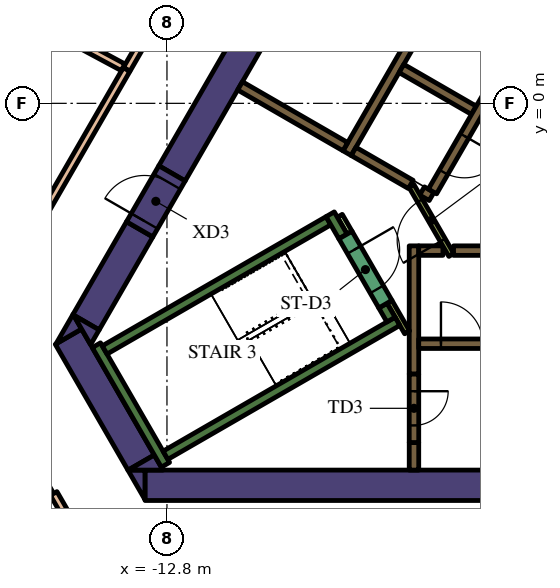
"""IFC4 building model, lengths in metres.
Left out: names, types, materials, properties, quantities, classifications, styles, units other than length and angle.
Written with IfcOpenShell. Run it as: python <this file> out.ifc"""

import sys

from ifc_helpers import new_model, si_unit, direction, frame, frame_2d, origin, place, context, subcontext, project, spatial, polyline, rectangle, outline, extrude, element, fill, save


model = new_model("IFC4")
c1 = context("Model", 3, precision=1e-05, world=origin(), true_north=direction((0.0, 1.0)))
c2 = subcontext(c1, "Body", "Model", "MODEL_VIEW")
j1 = project(units=[si_unit("LENGTHUNIT", "METRE"), si_unit("PLANEANGLEUNIT", "RADIAN")], contexts=[c1])
p1 = place(None, origin())
s1 = spatial("IfcSite", under=j1, at=p1, CompositionType="ELEMENT")
p2 = place(p1, origin())
s2 = spatial("IfcBuilding", under=s1, at=p2, CompositionType="ELEMENT")
p3 = place(p2, frame((0.0, 0.0, 196.2)))
s3 = spatial("IfcBuildingStorey", under=s2, at=p3, CompositionType="ELEMENT", Elevation=196.2)
p4 = place(p3, frame((-13.378, -10.05, 0.0), z_axis=(0.0, 0.0, 1.0), x_axis=(1.0, 0.0, 0.0)))
e1 = element("IfcWall", 1, at=p4, inside=s3, PredefinedType="SOLIDWALL", context=c2, shape_type="SweptSolid", body=[
    extrude(rectangle(XDim=22.282, YDim=0.8, at=frame_2d((11.141, 0.0))), origin(), (0.0, 0.0, 1.0), 5.4),
])
p5 = place(p3, origin())
e2 = element("IfcWall", 2, at=p5, inside=s3, PredefinedType="SOLIDWALL", context=c2, shape_type="SweptSolid", body=[
    extrude(outline(polyline([(-13.828, -9.65), (-13.38, -9.65), (-13.38, -10.426), (-13.828, -9.65)])), origin(), (0.0, 0.0, 1.0), 5.4),
])
p6 = place(p3, frame((-15.392, -6.14, 0.0), z_axis=(0.0, 0.0, 1.0), x_axis=(0.499984020225, -0.866034629516, 0.0)))
e3 = element("IfcWall", 3, at=p6, inside=s3, PredefinedType="SOLIDWALL", context=c2, shape_type="SweptSolid", body=[
    extrude(rectangle(XDim=3.824, YDim=0.8, at=frame_2d((1.912, 0.0))), origin(), (0.0, 0.0, 1.0), 5.4),
])
e4 = element("IfcWall", 4, at=p5, inside=s3, PredefinedType="SOLIDWALL", context=c2, shape_type="SweptSolid", body=[
    extrude(outline(polyline([(-15.047, -5.938), (-15.719, -6.326), (-15.271, -5.55), (-15.047, -5.938)])), origin(), (0.0, 0.0, 1.0), 5.4),
])
e5 = element("IfcWall", 5, at=p5, inside=s3, PredefinedType="SOLIDWALL", context=c2, shape_type="SweptSolid", body=[
    extrude(outline(polyline([(-12.904, -9.65), (-13.82, -9.65), (-13.133, -9.253), (-12.904, -9.65)])), origin(), (0.0, 0.0, 1.0), 5.4),
])
p7 = place(p3, frame((-13.518, -3.314, 0.0), z_axis=(0.0, 0.0, 1.0), x_axis=(-0.499969377405, -0.866043083026, 0.0)))
e6 = element("IfcWall", 6, at=p7, inside=s3, PredefinedType="SOLIDWALL", context=c2, shape_type="SweptSolid", body=[
    extrude(rectangle(XDim=2.824, YDim=0.8, at=frame_2d((1.412, 0.0))), origin(), (0.0, 0.0, 1.0), 5.4),
])
e7 = element("IfcWall", 7, at=p5, inside=s3, PredefinedType="SOLIDWALL", context=c2, shape_type="SweptSolid", body=[
    extrude(outline(polyline([(-14.809, -6.35), (-15.257, -5.574), (-14.585, -5.962), (-14.809, -6.35)])), origin(), (0.0, 0.0, 1.0), 5.4),
])
p8 = place(p3, frame((-4.321, 12.616, 0.0), z_axis=(0.0, 0.0, 1.0), x_axis=(-0.500009809857, -0.866019739987, 0.0)))
e8 = element("IfcWall", 8, at=p8, inside=s3, PredefinedType="SOLIDWALL", context=c2, shape_type="SweptSolid", body=[
    extrude(rectangle(XDim=16.695, YDim=0.8, at=frame_2d((8.347, 0.0))), origin(), (0.0, 0.0, 1.0), 5.4),
])
p9 = place(p3, frame((-12.84, -9.511, 0.0), z_axis=(0.0, 0.0, 1.0), x_axis=(-0.499997733992, 0.866026712061, 0.0)))
e9 = element("IfcWall", 9, at=p9, inside=s3, PredefinedType="SOLIDWALL", context=c2, shape_type="SweptSolid", body=[
    extrude(rectangle(XDim=3.634, YDim=0.25, at=frame_2d((1.817, 0.0))), origin(), (0.0, 0.0, 1.0), 5.4),
])
p10 = place(p3, frame((-14.44, -6.49, 0.0), z_axis=(0.0, 0.0, 1.0), x_axis=(0.866022966069, 0.500004222222, 0.0)))
e10 = element("IfcWall", 10, at=p10, inside=s3, PredefinedType="SOLIDWALL", context=c2, shape_type="SweptSolid", body=[
    extrude(rectangle(XDim=6.8, YDim=0.25, at=frame_2d((3.4, 0.0))), origin(), (0.0, 0.0, 1.0), 5.4),
])
p11 = place(p3, frame((-8.168, -3.503, 0.0), z_axis=(0.0, 0.0, 1.0), x_axis=(-0.499952099219, 0.866053057547, 0.0)))
e11 = element("IfcWall", 11, at=p11, inside=s3, PredefinedType="SOLIDWALL", context=c2, shape_type="SweptSolid", body=[
    extrude(rectangle(XDim=0.675, YDim=0.25, at=frame_2d((0.337, 0.0))), origin(), (0.0, 0.0, 1.0), 5.4),
])
p12 = place(p3, frame((-12.84, -9.261, 0.0), z_axis=(0.0, 0.0, 1.0), x_axis=(0.866016039709, 0.500016218704, 0.0)))
e12 = element("IfcWall", 12, at=p12, inside=s3, PredefinedType="SOLIDWALL", context=c2, shape_type="SweptSolid", body=[
    extrude(rectangle(XDim=7.05, YDim=0.25, at=frame_2d((3.525, 0.0))), origin(), (0.0, 0.0, 1.0), 5.4),
])
p13 = place(p3, frame((-6.905, -5.69, 0.0), z_axis=(0.0, 0.0, 1.0), x_axis=(-0.500402024738, 0.865793170242, 0.0)))
e13 = element("IfcWall", 13, at=p13, inside=s3, PredefinedType="SOLIDWALL", context=c2, shape_type="SweptSolid", body=[
    extrude(rectangle(XDim=0.425, YDim=0.25, at=frame_2d((0.212, 0.0))), origin(), (0.0, 0.0, 1.0), 5.4),
])
p14 = place(p3, frame((-6.3, -8.925, 0.0), z_axis=(0.0, 0.0, 1.0), x_axis=(0.0, -1.0, 0.0)))
e14 = element("IfcWall", 14, at=p14, inside=s3, PredefinedType="SOLIDWALL", context=c2, shape_type="SweptSolid", body=[
    extrude(rectangle(XDim=0.725, YDim=0.25, at=frame_2d((0.363, 0.0))), origin(), (0.0, 0.0, 1.0), 5.4),
])
p15 = place(p3, frame((-5.259, -3.875, 0.0), z_axis=(0.0, 0.0, 1.0), x_axis=(1.0, 0.0, 0.0)))
e15 = element("IfcWall", 15, at=p15, inside=s3, PredefinedType="SOLIDWALL", context=c2, shape_type="SweptSolid", body=[
    extrude(rectangle(XDim=10.489, YDim=0.25, at=frame_2d((5.244, 0.0))), origin(), (0.0, 0.0, 1.0), 5.4),
])
p16 = place(p3, frame((-6.3, -7.125, 0.0), z_axis=(0.0, 0.0, 1.0), x_axis=(0.0, 1.0, 0.0)))
e16 = element("IfcWall", 16, at=p16, inside=s3, PredefinedType="SOLIDWALL", context=c2, shape_type="SweptSolid", body=[
    extrude(rectangle(XDim=3.375, YDim=0.25, at=frame_2d((1.687, 0.0))), origin(), (0.0, 0.0, 1.0), 5.4),
])
p17 = place(p3, frame((-6.175, -3.875, 0.0), z_axis=(0.0, 0.0, 1.0), x_axis=(1.0, 0.0, 0.0)))
e17 = element("IfcWall", 17, at=p17, inside=s3, PredefinedType="SOLIDWALL", context=c2, shape_type="SweptSolid", body=[
    extrude(rectangle(XDim=0.637, YDim=0.25, at=frame_2d((0.318, 0.0))), origin(), (0.0, 0.0, 1.0), 5.4),
])
p18 = place(p3, frame((-3.02, 7.419, 0.0), z_axis=(0.0, 0.0, 1.0), x_axis=(-0.500022956343, -0.866012149528, 0.0)))
e18 = element("IfcWall", 18, at=p18, inside=s3, PredefinedType="SOLIDWALL", context=c2, shape_type="SweptSolid", body=[
    extrude(rectangle(XDim=10.08, YDim=0.25, at=frame_2d((5.04, 0.0))), origin(), (0.0, 0.0, 1.0), 5.4),
])
p19 = place(p3, frame((-4.724, -0.182, 0.0), z_axis=(0.0, 0.0, 1.0), x_axis=(-0.866008176907, 0.50002983664, 0.0)))
e19 = element("IfcWall", 19, at=p19, inside=s3, PredefinedType="SOLIDWALL", context=c2, shape_type="SweptSolid", body=[
    extrude(rectangle(XDim=2.2, YDim=0.25, at=frame_2d((1.1, 0.0))), origin(), (0.0, 0.0, 1.0), 5.4),
])
p20 = place(p3, frame((-6.088, -2.305, 0.0), z_axis=(0.0, 0.0, 1.0), x_axis=(0.866059450854, -0.499941024108, 0.0)))
e20 = element("IfcWall", 20, at=p20, inside=s3, PredefinedType="SOLIDWALL", context=c2, shape_type="SweptSolid", body=[
    extrude(rectangle(XDim=0.29, YDim=0.25, at=frame_2d((0.145, 0.0))), origin(), (0.0, 0.0, 1.0), 5.4),
])
p21 = place(p3, frame((-7.889, -1.265, 0.0), z_axis=(0.0, 0.0, 1.0), x_axis=(0.865986741702, -0.500066958712, 0.0)))
e21 = element("IfcWall", 21, at=p21, inside=s3, PredefinedType="SOLIDWALL", context=c2, shape_type="SweptSolid", body=[
    extrude(rectangle(XDim=1.738, YDim=0.25, at=frame_2d((0.869, 0.0))), origin(), (0.0, 0.0, 1.0), 5.4),
])
p22 = place(p3, frame((-8.106, -1.14, 0.0), z_axis=(0.0, 0.0, 1.0), x_axis=(-0.866008981251, 0.500028443584, 0.0)))
e22 = element("IfcWall", 22, at=p22, inside=s3, PredefinedType="SOLIDWALL", context=c2, shape_type="SweptSolid", body=[
    extrude(rectangle(XDim=3.2, YDim=0.25, at=frame_2d((1.6, 0.0))), origin(), (0.0, 0.0, 1.0), 5.4),
])
p23 = place(p3, frame((-8.252, -2.958, 0.0), z_axis=(0.0, 0.0, 1.0), x_axis=(0.500174715838, -0.865924508047, 0.0)))
e23 = element("IfcWall", 23, at=p23, inside=s3, PredefinedType="PARTITIONING", context=c2, shape_type="SweptSolid", body=[
    extrude(rectangle(XDim=0.514, YDim=0.15, at=frame_2d((0.257, 0.0))), origin(), (0.0, 0.0, 1.0), 4.65),
])
p24 = place(p3, frame((-6.48, -6.027, 0.0), z_axis=(0.0, 0.0, 1.0), x_axis=(-0.499927229454, 0.866067413802, 0.0)))
e24 = element("IfcWall", 24, at=p24, inside=s3, PredefinedType="PARTITIONING", context=c2, shape_type="SweptSolid", body=[
    extrude(rectangle(XDim=0.929, YDim=0.15, at=frame_2d((0.464, 0.0))), origin(), (0.0, 0.0, 1.0), 5.4),
])
p25 = place(p3, frame((-6.175, -6.325, 0.0), z_axis=(0.0, 0.0, 1.0), x_axis=(1.0, 0.0, 0.0)))
e25 = element("IfcWall", 25, at=p25, inside=s3, PredefinedType="SOLIDWALL", context=c2, shape_type="SweptSolid", body=[
    extrude(rectangle(XDim=12.35, YDim=0.25, at=frame_2d((6.175, 0.0))), origin(), (0.0, 0.0, 1.0), 5.4),
])
p26 = place(p25, frame((0.585, 0.0, 0.0)))
e26 = element("IfcOpeningElement", 26, at=p26, cuts=e25, PredefinedType="OPENING", context=c2, shape_type="SweptSolid", body=[
    extrude(rectangle(XDim=1.1, YDim=2.1, at=frame_2d((0.55, 1.05))), frame((0.0, 0.135, 0.0), z_axis=(0.0, -1.0, 0.0), x_axis=(1.0, 0.0, 0.0)), (0.0, 0.0, 1.0), 0.27),
])
p27 = place(p25, frame((3.105, 0.0, 0.0)))
e27 = element("IfcOpeningElement", 27, at=p27, cuts=e25, PredefinedType="OPENING", context=c2, shape_type="SweptSolid", body=[
    extrude(rectangle(XDim=1.1, YDim=2.1, at=frame_2d((0.55, 1.05))), frame((0.0, 0.135, 0.0), z_axis=(0.0, -1.0, 0.0), x_axis=(1.0, 0.0, 0.0)), (0.0, 0.0, 1.0), 0.27),
])
p28 = place(p25, frame((5.625, 0.0, 0.0)))
e28 = element("IfcOpeningElement", 28, at=p28, cuts=e25, PredefinedType="OPENING", context=c2, shape_type="SweptSolid", body=[
    extrude(rectangle(XDim=1.1, YDim=2.1, at=frame_2d((0.55, 1.05))), frame((0.0, 0.135, 0.0), z_axis=(0.0, -1.0, 0.0), x_axis=(1.0, 0.0, 0.0)), (0.0, 0.0, 1.0), 0.27),
])
p29 = place(p25, frame((8.145, 0.0, 0.0)))
e29 = element("IfcOpeningElement", 29, at=p29, cuts=e25, PredefinedType="OPENING", context=c2, shape_type="SweptSolid", body=[
    extrude(rectangle(XDim=1.1, YDim=2.1, at=frame_2d((0.55, 1.05))), frame((0.0, 0.135, 0.0), z_axis=(0.0, -1.0, 0.0), x_axis=(1.0, 0.0, 0.0)), (0.0, 0.0, 1.0), 0.27),
])
p30 = place(p25, frame((10.665, 0.0, 0.0)))
e30 = element("IfcOpeningElement", 30, at=p30, cuts=e25, PredefinedType="OPENING", context=c2, shape_type="SweptSolid", body=[
    extrude(rectangle(XDim=1.1, YDim=2.1, at=frame_2d((0.55, 1.05))), frame((0.0, 0.135, 0.0), z_axis=(0.0, -1.0, 0.0), x_axis=(1.0, 0.0, 0.0)), (0.0, 0.0, 1.0), 0.27),
])
p31 = place(p3, frame((-0.898, 6.194, 0.0), z_axis=(0.0, 0.0, 1.0), x_axis=(-0.499996202215, -0.866027596426, 0.0)))
e31 = element("IfcWall", 31, at=p31, inside=s3, PredefinedType="SOLIDWALL", context=c2, shape_type="SweptSolid", body=[
    extrude(rectangle(XDim=9.83, YDim=0.25, at=frame_2d((4.915, 0.0))), origin(), (0.0, 0.0, 1.0), 5.4),
])
p32 = place(p31, frame((0.585, 0.0, 0.0)))
e32 = element("IfcOpeningElement", 32, at=p32, cuts=e31, PredefinedType="OPENING", context=c2, shape_type="SweptSolid", body=[
    extrude(rectangle(XDim=1.1, YDim=2.1, at=frame_2d((0.55, 1.05))), frame((0.0, 0.135, 0.0), z_axis=(0.0, -1.0, 0.0), x_axis=(1.0, 0.0, 0.0)), (0.0, 0.0, 1.0), 0.27),
])
p33 = place(p31, frame((3.105, 0.0, 0.0)))
e33 = element("IfcOpeningElement", 33, at=p33, cuts=e31, PredefinedType="OPENING", context=c2, shape_type="SweptSolid", body=[
    extrude(rectangle(XDim=1.1, YDim=2.1, at=frame_2d((0.55, 1.05))), frame((0.0, 0.135, 0.0), z_axis=(0.0, -1.0, 0.0), x_axis=(1.0, 0.0, 0.0)), (0.0, 0.0, 1.0), 0.27),
])
p34 = place(p31, frame((5.625, 0.0, 0.0)))
e34 = element("IfcOpeningElement", 34, at=p34, cuts=e31, PredefinedType="OPENING", context=c2, shape_type="SweptSolid", body=[
    extrude(rectangle(XDim=1.1, YDim=2.1, at=frame_2d((0.55, 1.05))), frame((0.0, 0.135, 0.0), z_axis=(0.0, -1.0, 0.0), x_axis=(1.0, 0.0, 0.0)), (0.0, 0.0, 1.0), 0.27),
])
p35 = place(p31, frame((8.145, 0.0, 0.0)))
e35 = element("IfcOpeningElement", 35, at=p35, cuts=e31, PredefinedType="OPENING", context=c2, shape_type="SweptSolid", body=[
    extrude(rectangle(XDim=1.1, YDim=2.1, at=frame_2d((0.55, 1.05))), frame((0.0, 0.135, 0.0), z_axis=(0.0, -1.0, 0.0), x_axis=(1.0, 0.0, 0.0)), (0.0, 0.0, 1.0), 0.27),
])
p36 = place(p3, frame((-8.103, -3.466, 0.0), z_axis=(0.0, 0.0, 1.0), x_axis=(0.500078061341, -0.865980330357, 0.0)))
e36 = element("IfcWall", 36, at=p36, inside=s3, PredefinedType="SOLIDWALL", context=c2, shape_type="SweptSolid", body=[
    extrude(rectangle(XDim=2.1, YDim=0.4, at=frame_2d((1.05, 0.0))), origin(), (0.0, 0.0, 1.0), 5.4),
])
p37 = place(p36, frame((0.45, 0.0, 0.0)))
e37 = element("IfcOpeningElement", 37, at=p37, cuts=e36, PredefinedType="OPENING", context=c2, shape_type="SweptSolid", body=[
    extrude(rectangle(XDim=1.2, YDim=2.1, at=frame_2d((0.6, 1.05))), frame((0.0, 0.21, 0.0), z_axis=(0.0, -1.0, 0.0), x_axis=(1.0, 0.0, 0.0)), (0.0, 0.0, 1.0), 0.42),
])
p38 = place(p3, frame((-6.3, -7.125, 0.0), z_axis=(0.0, 0.0, 1.0), x_axis=(0.0, -1.0, 0.0)))
e38 = element("IfcWall", 38, at=p38, inside=s3, PredefinedType="SOLIDWALL", context=c2, shape_type="SweptSolid", body=[
    extrude(rectangle(XDim=1.8, YDim=0.25, at=frame_2d((0.9, 0.0))), origin(), (0.0, 0.0, 1.0), 5.4),
])
p39 = place(p38, frame((0.45, 0.0, 0.0)))
e39 = element("IfcOpeningElement", 39, at=p39, cuts=e38, PredefinedType="OPENING", context=c2, shape_type="SweptSolid", body=[
    extrude(rectangle(XDim=0.9, YDim=2.1, at=frame_2d((0.45, 1.05))), frame((0.0, 0.135, 0.0), z_axis=(0.0, -1.0, 0.0), x_axis=(1.0, 0.0, 0.0)), (0.0, 0.0, 1.0), 0.27),
])
p40 = place(p3, frame((-5.317, -3.99, 0.0), z_axis=(0.0, 0.0, 1.0), x_axis=(-0.500027713859, 0.866009402589, 0.0)))
e40 = element("IfcWall", 40, at=p40, inside=s3, PredefinedType="PARTITIONING", context=c2, shape_type="SweptSolid", body=[
    extrude(rectangle(XDim=2.1, YDim=0.15, at=frame_2d((1.05, 0.0))), origin(), (0.0, 0.0, 1.0), 5.4),
])
p41 = place(p40, frame((0.45, 0.0, 0.0)))
e41 = element("IfcOpeningElement", 41, at=p41, cuts=e40, PredefinedType="OPENING", context=c2, shape_type="SweptSolid", body=[
    extrude(rectangle(XDim=1.2, YDim=2.1, at=frame_2d((0.6, 1.05))), frame((0.0, 0.085, 0.0), z_axis=(0.0, -1.0, 0.0), x_axis=(1.0, 0.0, 0.0)), (0.0, 0.0, 1.0), 0.17),
])
p42 = place(p3, frame((-13.518, -3.314, 0.0), z_axis=(0.0, 0.0, 1.0), x_axis=(0.500000056704, 0.866025371046, 0.0)))
e42 = element("IfcWall", 42, at=p42, inside=s3, PredefinedType="SOLIDWALL", context=c2, shape_type="SweptSolid", body=[
    extrude(rectangle(XDim=1.7, YDim=0.8, at=frame_2d((0.85, 0.0))), origin(), (0.0, 0.0, 1.0), 5.4),
])
p43 = place(p42, frame((0.25, 0.0, 0.0)))
e43 = element("IfcOpeningElement", 43, at=p43, cuts=e42, PredefinedType="OPENING", context=c2, shape_type="SweptSolid", body=[
    extrude(rectangle(XDim=1.2, YDim=2.1, at=frame_2d((0.6, 1.05))), frame((0.0, 0.41, 0.0), z_axis=(0.0, -1.0, 0.0), x_axis=(1.0, 0.0, 0.0)), (0.0, 0.0, 1.0), 0.82),
])
p44 = place(p3, frame((-7.706, 11.553, 0.0), z_axis=(0.0, 0.0, 1.0), x_axis=(-0.500005845305, -0.86602202897, 0.0)))
e44 = element("IfcWall", 44, at=p44, inside=s3, PredefinedType="PARTITIONING", context=c2, shape_type="SweptSolid", body=[
    extrude(rectangle(XDim=12.304, YDim=0.2, at=frame_2d((6.152, 0.0))), origin(), (0.0, 0.0, 1.0), 4.65),
])
p45 = place(p44, frame((5.552, 0.0, 0.0)))
e45 = element("IfcOpeningElement", 45, at=p45, cuts=e44, PredefinedType="OPENING", context=c2, shape_type="SweptSolid", body=[
    extrude(rectangle(XDim=1.2, YDim=2.1, at=frame_2d((0.6, 1.05))), frame((0.0, 0.11, 0.0), z_axis=(0.0, -1.0, 0.0), x_axis=(1.0, 0.0, 0.0)), (0.0, 0.0, 1.0), 0.22),
])
p46 = place(p3, frame((-25.969, -16.032, 0.0), z_axis=(0.0, 0.0, 1.0), x_axis=(0.866024433663, 0.500001680296, 0.0)))
e46 = element("IfcWall", 46, at=p46, inside=s3, PredefinedType="PARTITIONING", context=c2, shape_type="SweptSolid", body=[
    extrude(rectangle(XDim=11.706, YDim=0.2, at=frame_2d((5.853, 0.0))), origin(), (0.0, 0.0, 1.0), 4.65),
])
p47 = place(p46, frame((5.053, 0.0, 0.0)))
e47 = element("IfcOpeningElement", 47, at=p47, cuts=e46, PredefinedType="OPENING", context=c2, shape_type="SweptSolid", body=[
    extrude(rectangle(XDim=1.6, YDim=2.1, at=frame_2d((0.8, 1.05))), frame((0.0, 0.11, 0.0), z_axis=(0.0, -1.0, 0.0), x_axis=(1.0, 0.0, 0.0)), (0.0, 0.0, 1.0), 0.22),
])
p48 = place(p3, frame((-18.042, -6.35, 0.0), z_axis=(0.0, 0.0, 1.0), x_axis=(0.499990460161, 0.866030911543, 0.0)))
e48 = element("IfcWall", 48, at=p48, inside=s3, PredefinedType="PARTITIONING", context=c2, shape_type="SweptSolid", body=[
    extrude(rectangle(XDim=8.359, YDim=0.2, at=frame_2d((4.179, 0.0))), origin(), (0.0, 0.0, 1.0), 4.65),
])
p49 = place(p3, frame((-19.905, 4.146, 0.0), z_axis=(0.0, 0.0, 1.0), x_axis=(0.880882800882, -0.473334438964, 0.0)))
e49 = element("IfcWall", 49, at=p49, inside=s3, PredefinedType="PARTITIONING", context=c2, shape_type="SweptSolid", body=[
    extrude(rectangle(XDim=6.754, YDim=0.2, at=frame_2d((3.377, 0.0))), origin(), (0.0, 0.0, 1.0), 4.65),
])
p50 = place(p3, frame((-14.565, -12.372, 0.0), z_axis=(0.0, 0.0, 1.0), x_axis=(-0.499983176524, 0.866035116605, 0.0)))
e50 = element("IfcWall", 50, at=p50, inside=s3, PredefinedType="PARTITIONING", context=c2, shape_type="SweptSolid", body=[
    extrude(rectangle(XDim=2.432, YDim=0.2, at=frame_2d((1.216, 0.0))), origin(), (0.0, 0.0, 1.0), 4.65),
])
p51 = place(p26, origin())
e51 = element("IfcDoor", 51, at=p51, inside=s3, OperationType="DOUBLE_DOOR_SLIDING", PredefinedType="DOOR", context=c2, shape_type="SweptSolid", body=[
    extrude(rectangle(XDim=1.1, YDim=2.1, at=frame_2d((0.55, 1.05))), frame((0.0, 0.025, 0.0), z_axis=(0.0, -1.0, 0.0), x_axis=(1.0, 0.0, 0.0)), (0.0, 0.0, 1.0), 0.05),
])
fill(e26, e51)
p52 = place(p35, origin())
e52 = element("IfcDoor", 52, at=p52, inside=s3, OperationType="DOUBLE_DOOR_SLIDING", PredefinedType="DOOR", context=c2, shape_type="SweptSolid", body=[
    extrude(rectangle(XDim=1.1, YDim=2.1, at=frame_2d((0.55, 1.05))), frame((0.0, 0.025, 0.0), z_axis=(0.0, -1.0, 0.0), x_axis=(1.0, 0.0, 0.0)), (0.0, 0.0, 1.0), 0.05),
])
fill(e35, e52)
p53 = place(p37, origin())
e53 = element("IfcDoor", 53, at=p53, inside=s3, OperationType="SINGLE_SWING_LEFT", PredefinedType="DOOR", context=c2, shape_type="SweptSolid", body=[
    extrude(rectangle(XDim=1.2, YDim=2.1, at=frame_2d((0.6, 1.05))), frame((0.0, 0.025, 0.0), z_axis=(0.0, -1.0, 0.0), x_axis=(1.0, 0.0, 0.0)), (0.0, 0.0, 1.0), 0.05),
])
fill(e37, e53)
p54 = place(p39, origin())
e54 = element("IfcDoor", 54, at=p54, inside=s3, OperationType="SINGLE_SWING_LEFT", PredefinedType="DOOR", context=c2, shape_type="SweptSolid", body=[
    extrude(rectangle(XDim=0.9, YDim=2.1, at=frame_2d((0.45, 1.05))), frame((0.0, 0.025, 0.0), z_axis=(0.0, -1.0, 0.0), x_axis=(1.0, 0.0, 0.0)), (0.0, 0.0, 1.0), 0.05),
])
fill(e39, e54)
p55 = place(p41, origin())
e55 = element("IfcDoor", 55, at=p55, inside=s3, OperationType="SINGLE_SWING_LEFT", PredefinedType="DOOR", context=c2, shape_type="SweptSolid", body=[
    extrude(rectangle(XDim=1.2, YDim=2.1, at=frame_2d((0.6, 1.05))), frame((0.0, 0.025, 0.0), z_axis=(0.0, -1.0, 0.0), x_axis=(1.0, 0.0, 0.0)), (0.0, 0.0, 1.0), 0.05),
])
fill(e41, e55)
p56 = place(p43, origin())
e56 = element("IfcDoor", 56, at=p56, inside=s3, OperationType="SINGLE_SWING_LEFT", PredefinedType="DOOR", context=c2, shape_type="SweptSolid", body=[
    extrude(rectangle(XDim=1.2, YDim=2.1, at=frame_2d((0.6, 1.05))), frame((0.0, 0.025, 0.0), z_axis=(0.0, -1.0, 0.0), x_axis=(1.0, 0.0, 0.0)), (0.0, 0.0, 1.0), 0.05),
])
fill(e43, e56)
save(model, sys.argv[1])
